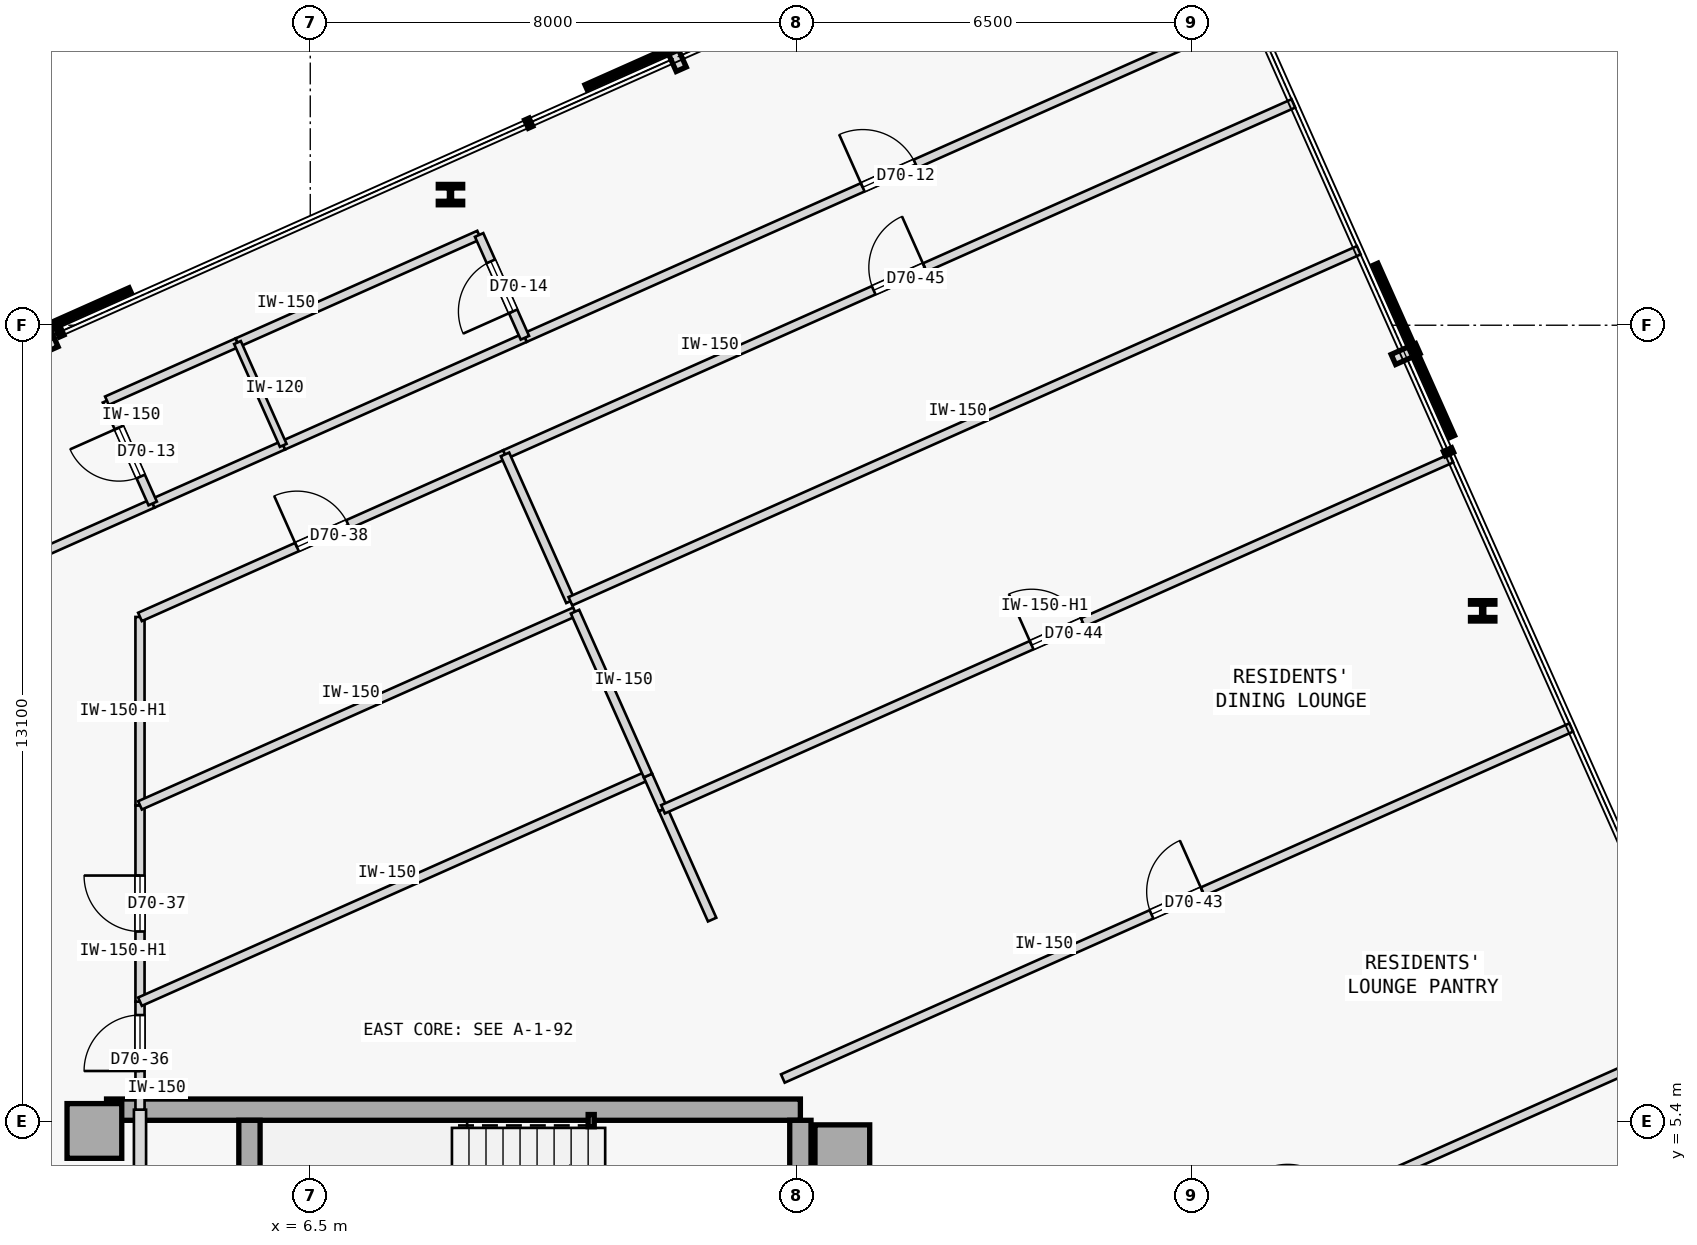
"""IFC4 building model, lengths in metres.
Left out: names, types, materials, properties, quantities, classifications, styles, units other than length and angle.
Written with IfcOpenShell. Run it as: python <this file> out.ifc"""

import sys

from ifc_helpers import new_model, si_unit, direction, frame, frame_2d, origin, origin_2d, place, context, subcontext, project, spatial, rectangle, hollow_rectangle, i_section, extrude, element, fill, save


model = new_model("IFC4")
c1 = context("Model", 3, precision=1e-05, world=origin(), true_north=direction((0.0, 1.0)))
c2 = subcontext(c1, "Body", "Model", "MODEL_VIEW")
j1 = project(units=[si_unit("LENGTHUNIT", "METRE"), si_unit("PLANEANGLEUNIT", "RADIAN")], contexts=[c1])
p1 = place(None, origin())
s1 = spatial("IfcSite", under=j1, at=p1, CompositionType="ELEMENT")
p2 = place(p1, origin())
s2 = spatial("IfcBuilding", under=s1, at=p2, CompositionType="ELEMENT")
p3 = place(p2, frame((0.0, 0.0, 262.2)))
s3 = spatial("IfcBuildingStorey", under=s2, at=p3, CompositionType="ELEMENT", Elevation=262.2)
for number, where, z_axis, x_axis in (
    (1, (15.25, 4.9, 0.0), (0.0, 0.0, 1.0), (1.0, 0.0, 0.0)),
    (2, (2.95, 5.25, 0.0), (0.0, 0.0, 1.0), (1.0, 0.0, 0.0)),
):
    element("IfcColumn", number, at=place(p3, frame(where, z_axis=z_axis, x_axis=x_axis)), inside=s3, PredefinedType="COLUMN", context=c2, shape_type="SweptSolid", body=[
        extrude(rectangle(XDim=0.9, YDim=0.9, at=origin_2d()), origin(), (0.0, 0.0, 1.0), 3.35),
    ])
p4 = place(p3, frame((3.15, 5.6, 0.0), z_axis=(0.0, 0.0, 1.0), x_axis=(1.0, 0.0, 0.0)))
e3 = element("IfcWall", 3, at=p4, inside=s3, PredefinedType="SHEAR", context=c2, shape_type="SweptSolid", body=[
    extrude(rectangle(XDim=11.41, YDim=0.35, at=frame_2d((5.705, 0.0))), origin(), (0.0, 0.0, 1.0), 3.125),
])
p5 = place(p3, frame((14.56, -5.425, 0.0), z_axis=(0.0, 0.0, 1.0), x_axis=(0.0, 1.0, 0.0)))
e4 = element("IfcWall", 4, at=p5, inside=s3, PredefinedType="SHEAR", context=c2, shape_type="SweptSolid", body=[
    extrude(rectangle(XDim=10.85, YDim=0.35, at=frame_2d((5.425, 0.0))), origin(), (0.0, 0.0, 1.0), 3.125),
])
p6 = place(p3, frame((5.5, 2.15, 0.0), z_axis=(0.0, 0.0, 1.0), x_axis=(0.0, 1.0, 0.0)))
e5 = element("IfcWall", 5, at=p6, inside=s3, PredefinedType="SHEAR", context=c2, shape_type="SweptSolid", body=[
    extrude(rectangle(XDim=3.275, YDim=0.35, at=frame_2d((1.638, 0.0))), origin(), (0.0, 0.0, 1.0), 3.125),
])
p7 = place(p3, frame((11.12, 5.42, 0.0), z_axis=(0.0, 0.0, 1.0), x_axis=(1.0, 0.0, 0.0)))
e6 = element("IfcColumn", 6, at=p7, inside=s3, PredefinedType="COLUMN", context=c2, shape_type="SweptSolid", body=[
    extrude(hollow_rectangle(XDim=0.1, YDim=0.2, WallThickness=0.008, at=origin_2d()), origin(), (0.0, 0.0, 1.0), 3.35),
])
for number, where, z_axis, x_axis in (
    (7, (25.781, 13.803, 0.0), (0.0, 0.0, 1.0), (1.0, 0.0, 0.0)),
    (8, (8.806, 20.648, 0.0), (0.0, 0.0, 1.0), (1.0, 0.0, 0.0)),
):
    element("IfcColumn", number, at=place(p3, frame(where, z_axis=z_axis, x_axis=x_axis)), inside=s3, PredefinedType="COLUMN", context=c2, shape_type="SweptSolid", body=[
        extrude(i_section(OverallWidth=0.401, OverallDepth=0.335, WebThickness=0.036, FlangeThickness=0.058, FilletRadius=0.015, at=origin_2d()), origin(), (0.0, 0.0, 1.0), 3.35),
    ])
p8 = place(p3, frame((3.7, -1.15, 0.0), z_axis=(0.0, 0.0, 1.0), x_axis=(0.0, 1.0, 0.0)))
e9 = element("IfcWall", 9, at=p8, inside=s3, PredefinedType="STANDARD", context=c2, shape_type="SweptSolid", body=[
    extrude(rectangle(XDim=6.75, YDim=0.2, at=frame_2d((3.375, 0.0))), origin(), (0.0, 0.0, 1.0), 3.125),
])
p9 = place(p8, frame((3.6, 0.0, 0.0)))
e10 = element("IfcOpeningElement", 10, at=p9, cuts=e9, PredefinedType="OPENING", context=c2, shape_type="SweptSolid", body=[
    extrude(rectangle(XDim=0.92, YDim=2.15, at=frame_2d((0.46, 1.075))), frame((0.0, 0.11, 0.0), z_axis=(0.0, -1.0, 0.0), x_axis=(1.0, 0.0, 0.0)), (0.0, 0.0, 1.0), 0.22),
])
p10 = place(p3, frame((-1.166, 13.31, 0.0), z_axis=(0.0, 0.0, 1.0), x_axis=(0.913554005831, 0.406717442988, 0.0)))
e11 = element("IfcWall", 11, at=p10, inside=s3, PredefinedType="PARTITIONING", context=c2, shape_type="SweptSolid", body=[
    extrude(rectangle(XDim=5.555, YDim=0.15, at=frame_2d((2.777, 0.0))), origin(), (0.0, 0.0, 1.0), 3.125),
])
p11 = place(p3, frame((10.03, 18.294, 0.0), z_axis=(0.0, 0.0, 1.0), x_axis=(0.913545706015, 0.406736085222, 0.0)))
e12 = element("IfcWall", 12, at=p11, inside=s3, PredefinedType="PARTITIONING", context=c2, shape_type="SweptSolid", body=[
    extrude(rectangle(XDim=13.113, YDim=0.15, at=frame_2d((6.557, 0.0))), origin(), (0.0, 0.0, 1.0), 3.125),
])
p12 = place(p11, frame((6.082, 0.0, 0.0)))
e13 = element("IfcOpeningElement", 13, at=p12, cuts=e12, PredefinedType="OPENING", context=c2, shape_type="SweptSolid", body=[
    extrude(rectangle(XDim=0.95, YDim=2.15, at=frame_2d((0.475, 1.075))), frame((0.0, 0.085, 0.0), z_axis=(0.0, -1.0, 0.0), x_axis=(1.0, 0.0, 0.0)), (0.0, 0.0, 1.0), 0.17),
])
p13 = place(p3, frame((3.909, 15.569, 0.0), z_axis=(0.0, 0.0, 1.0), x_axis=(0.913541436194, 0.406745675276, 0.0)))
e14 = element("IfcWall", 14, at=p13, inside=s3, PredefinedType="PARTITIONING", context=c2, shape_type="SweptSolid", body=[
    extrude(rectangle(XDim=2.35, YDim=0.15, at=frame_2d((1.175, 0.0))), origin(), (0.0, 0.0, 1.0), 3.125),
])
p14 = place(p3, frame((6.055, 16.525, 0.0), z_axis=(0.0, 0.0, 1.0), x_axis=(0.913554477336, 0.406716383908, 0.0)))
e15 = element("IfcWall", 15, at=p14, inside=s3, PredefinedType="PARTITIONING", context=c2, shape_type="SweptSolid", body=[
    extrude(rectangle(XDim=4.35, YDim=0.15, at=frame_2d((2.175, 0.0))), origin(), (0.0, 0.0, 1.0), 3.125),
])
p15 = place(p3, frame((3.7, 5.601, 0.0), z_axis=(0.0, 0.0, 1.0), x_axis=(0.0, 1.0, 0.0)))
e16 = element("IfcWall", 16, at=p15, inside=s3, PredefinedType="PARTITIONING", context=c2, shape_type="SweptSolid", body=[
    extrude(rectangle(XDim=1.775, YDim=0.15, at=frame_2d((0.888, 0.0))), origin(), (0.0, 0.0, 1.0), 3.125),
])
p16 = place(p15, frame((0.635, 0.0, 0.0)))
e17 = element("IfcOpeningElement", 17, at=p16, cuts=e16, PredefinedType="OPENING", context=c2, shape_type="SweptSolid", body=[
    extrude(rectangle(XDim=0.92, YDim=2.15, at=frame_2d((0.46, 1.075))), frame((0.0, 0.085, 0.0), z_axis=(0.0, -1.0, 0.0), x_axis=(1.0, 0.0, 0.0)), (0.0, 0.0, 1.0), 0.17),
])
p17 = place(p3, frame((3.7, 7.376, 0.0), z_axis=(0.0, 0.0, 1.0), x_axis=(0.0, 1.0, 0.0)))
e18 = element("IfcWall", 18, at=p17, inside=s3, PredefinedType="PARTITIONING", context=c2, shape_type="SweptSolid", body=[
    extrude(rectangle(XDim=3.228, YDim=0.15, at=frame_2d((1.614, 0.0))), origin(), (0.0, 0.0, 1.0), 2.675),
])
p18 = place(p17, frame((1.154, 0.0, 0.0)))
e19 = element("IfcOpeningElement", 19, at=p18, cuts=e18, PredefinedType="OPENING", context=c2, shape_type="SweptSolid", body=[
    extrude(rectangle(XDim=0.92, YDim=2.15, at=frame_2d((0.46, 1.075))), frame((0.0, 0.085, 0.0), z_axis=(0.0, -1.0, 0.0), x_axis=(1.0, 0.0, 0.0)), (0.0, 0.0, 1.0), 0.17),
])
p19 = place(p3, frame((3.7, 10.604, 0.0), z_axis=(0.0, 0.0, 1.0), x_axis=(-0.000157567161, 0.999999987586, 0.0)))
e20 = element("IfcWall", 20, at=p19, inside=s3, PredefinedType="PARTITIONING", context=c2, shape_type="SweptSolid", body=[
    extrude(rectangle(XDim=3.099, YDim=0.15, at=frame_2d((1.549, 0.0))), origin(), (0.0, 0.0, 1.0), 2.675),
])
p20 = place(p3, frame((3.7, 13.703, 0.0), z_axis=(0.0, 0.0, 1.0), x_axis=(0.913549363376, 0.406727870542, 0.0)))
e21 = element("IfcWall", 21, at=p20, inside=s3, PredefinedType="PARTITIONING", context=c2, shape_type="SweptSolid", body=[
    extrude(rectangle(XDim=6.571, YDim=0.15, at=frame_2d((3.286, 0.0))), origin(), (0.0, 0.0, 1.0), 3.125),
])
p21 = place(p20, frame((2.825, 0.0, 0.0)))
e22 = element("IfcOpeningElement", 22, at=p21, cuts=e21, PredefinedType="OPENING", context=c2, shape_type="SweptSolid", body=[
    extrude(rectangle(XDim=0.92, YDim=2.15, at=frame_2d((0.46, 1.075))), frame((0.0, 0.085, 0.0), z_axis=(0.0, -1.0, 0.0), x_axis=(1.0, 0.0, 0.0)), (0.0, 0.0, 1.0), 0.17),
])
p22 = place(p3, frame((9.703, 16.375, 0.0), z_axis=(0.0, 0.0, 1.0), x_axis=(0.913544622417, 0.406738519018, 0.0)))
e23 = element("IfcWall", 23, at=p22, inside=s3, PredefinedType="PARTITIONING", context=c2, shape_type="SweptSolid", body=[
    extrude(rectangle(XDim=14.192, YDim=0.15, at=frame_2d((7.096, 0.0))), origin(), (0.0, 0.0, 1.0), 3.125),
])
p23 = place(p22, frame((6.636, 0.0, 0.0)))
e24 = element("IfcOpeningElement", 24, at=p23, cuts=e23, PredefinedType="OPENING", context=c2, shape_type="SweptSolid", body=[
    extrude(rectangle(XDim=0.92, YDim=2.15, at=frame_2d((0.46, 1.075))), frame((0.0, 0.085, 0.0), z_axis=(0.0, -1.0, 0.0), x_axis=(1.0, 0.0, 0.0)), (0.0, 0.0, 1.0), 0.17),
])
p24 = place(p3, frame((3.909, 15.569, 0.0), z_axis=(0.0, 0.0, 1.0), x_axis=(-0.406701600856, 0.913561058639, 0.0)))
e25 = element("IfcWall", 25, at=p24, inside=s3, PredefinedType="PARTITIONING", context=c2, shape_type="SweptSolid", body=[
    extrude(rectangle(XDim=1.85, YDim=0.15, at=frame_2d((0.925, 0.0))), origin(), (0.0, 0.0, 1.0), 3.125),
])
p25 = place(p24, frame((0.485, 0.0, 0.0)))
e26 = element("IfcOpeningElement", 26, at=p25, cuts=e25, PredefinedType="OPENING", context=c2, shape_type="SweptSolid", body=[
    extrude(rectangle(XDim=0.88, YDim=2.15, at=frame_2d((0.44, 1.075))), frame((0.0, 0.085, 0.0), z_axis=(0.0, -1.0, 0.0), x_axis=(1.0, 0.0, 0.0)), (0.0, 0.0, 1.0), 0.17),
])
p26 = place(p3, frame((3.156, 17.259, 0.0), z_axis=(0.0, 0.0, 1.0), x_axis=(0.913541436194, 0.406745675276, 0.0)))
e27 = element("IfcWall", 27, at=p26, inside=s3, PredefinedType="PARTITIONING", context=c2, shape_type="SweptSolid", body=[
    extrude(rectangle(XDim=2.35, YDim=0.15, at=frame_2d((1.175, 0.0))), origin(), (0.0, 0.0, 1.0), 3.125),
])
p27 = place(p3, frame((5.303, 18.215, 0.0), z_axis=(0.0, 0.0, 1.0), x_axis=(0.913554477336, 0.406716383908, 0.0)))
e28 = element("IfcWall", 28, at=p27, inside=s3, PredefinedType="PARTITIONING", context=c2, shape_type="SweptSolid", body=[
    extrude(rectangle(XDim=4.35, YDim=0.15, at=frame_2d((2.175, 0.0))), origin(), (0.0, 0.0, 1.0), 3.125),
])
p28 = place(p3, frame((10.03, 18.294, 0.0), z_axis=(0.0, 0.0, 1.0), x_axis=(-0.406701600856, 0.913561058639, 0.0)))
e29 = element("IfcWall", 29, at=p28, inside=s3, PredefinedType="PARTITIONING", context=c2, shape_type="SweptSolid", body=[
    extrude(rectangle(XDim=1.85, YDim=0.15, at=frame_2d((0.925, 0.0))), origin(), (0.0, 0.0, 1.0), 3.125),
])
p29 = place(p28, frame((0.475, 0.0, 0.0)))
e30 = element("IfcOpeningElement", 30, at=p29, cuts=e29, PredefinedType="OPENING", context=c2, shape_type="SweptSolid", body=[
    extrude(rectangle(XDim=0.9, YDim=2.15, at=frame_2d((0.45, 1.075))), frame((0.0, 0.085, 0.0), z_axis=(0.0, -1.0, 0.0), x_axis=(1.0, 0.0, 0.0)), (0.0, 0.0, 1.0), 0.17),
])
p30 = place(p3, frame((6.055, 16.525, 0.0), z_axis=(0.0, 0.0, 1.0), x_axis=(-0.406701600856, 0.913561058639, 0.0)))
e31 = element("IfcWall", 31, at=p30, inside=s3, PredefinedType="PARTITIONING", context=c2, shape_type="SweptSolid", body=[
    extrude(rectangle(XDim=1.85, YDim=0.12, at=frame_2d((0.925, 0.0))), origin(), (0.0, 0.0, 1.0), 3.125),
])
p31 = place(p3, frame((3.7, 7.376, 0.0), z_axis=(0.0, 0.0, 1.0), x_axis=(0.91354490899, 0.406737875367, 0.0)))
e32 = element("IfcWall", 32, at=p31, inside=s3, PredefinedType="PARTITIONING", context=c2, shape_type="SweptSolid", body=[
    extrude(rectangle(XDim=9.144, YDim=0.15, at=frame_2d((4.572, 0.0))), origin(), (0.0, 0.0, 1.0), 3.125),
])
p32 = place(p3, frame((13.109, 8.726, 0.0), z_axis=(0.0, 0.0, 1.0), x_axis=(-0.406788519224, 0.913522359128, 0.0)))
e33 = element("IfcWall", 33, at=p32, inside=s3, PredefinedType="PARTITIONING", context=c2, shape_type="SweptSolid", body=[
    extrude(rectangle(XDim=1.986, YDim=0.15, at=frame_2d((0.993, 0.0))), origin(), (0.0, 0.0, 1.0), 3.125),
])
p33 = place(p3, frame((12.301, 10.54, 0.0), z_axis=(0.0, 0.0, 1.0), x_axis=(-0.406436552015, 0.913679007741, 0.0)))
e34 = element("IfcWall", 34, at=p33, inside=s3, PredefinedType="PARTITIONING", context=c2, shape_type="SweptSolid", body=[
    extrude(rectangle(XDim=0.608, YDim=0.15, at=frame_2d((0.304, 0.0))), origin(), (0.0, 0.0, 1.0), 3.125),
])
p34 = place(p3, frame((3.7, 10.604, 0.0), z_axis=(0.0, 0.0, 1.0), x_axis=(0.913534926439, 0.406760295722, 0.0)))
e35 = element("IfcWall", 35, at=p34, inside=s3, PredefinedType="PARTITIONING", context=c2, shape_type="SweptSolid", body=[
    extrude(rectangle(XDim=7.831, YDim=0.15, at=frame_2d((3.916, 0.0))), origin(), (0.0, 0.0, 1.0), 3.125),
])
p35 = place(p3, frame((12.054, 11.095, 0.0), z_axis=(0.0, 0.0, 1.0), x_axis=(-0.406798922371, 0.91351772657, 0.0)))
e36 = element("IfcWall", 36, at=p35, inside=s3, PredefinedType="PARTITIONING", context=c2, shape_type="SweptSolid", body=[
    extrude(rectangle(XDim=2.949, YDim=0.15, at=frame_2d((1.475, 0.0))), origin(), (0.0, 0.0, 1.0), 3.125),
])
p36 = place(p3, frame((10.778, 13.961, 0.0), z_axis=(0.0, 0.0, 1.0), x_axis=(-0.406712614091, 0.913556155657, 0.0)))
e37 = element("IfcWall", 37, at=p36, inside=s3, PredefinedType="PARTITIONING", context=c2, shape_type="SweptSolid", body=[
    extrude(rectangle(XDim=2.643, YDim=0.15, at=frame_2d((1.322, 0.0))), origin(), (0.0, 0.0, 1.0), 3.125),
])
p37 = place(p3, frame((16.512, 1.082, 0.0), z_axis=(0.0, 0.0, 1.0), x_axis=(0.913544622417, 0.406738519018, 0.0)))
e38 = element("IfcWall", 38, at=p37, inside=s3, PredefinedType="PARTITIONING", context=c2, shape_type="SweptSolid", body=[
    extrude(rectangle(XDim=14.192, YDim=0.15, at=frame_2d((7.096, 0.0))), origin(), (0.0, 0.0, 1.0), 3.125),
])
p38 = place(p37, frame((6.636, 0.0, 0.0)))
e39 = element("IfcOpeningElement", 39, at=p38, cuts=e38, PredefinedType="OPENING", context=c2, shape_type="SweptSolid", body=[
    extrude(rectangle(XDim=0.92, YDim=2.15, at=frame_2d((0.46, 1.075))), frame((0.0, 0.085, 0.0), z_axis=(0.0, -1.0, 0.0), x_axis=(1.0, 0.0, 0.0)), (0.0, 0.0, 1.0), 0.17),
])
p39 = place(p3, frame((14.272, 6.113, 0.0), z_axis=(0.0, 0.0, 1.0), x_axis=(0.913551014388, 0.406724162191, 0.0)))
e40 = element("IfcWall", 40, at=p39, inside=s3, PredefinedType="PARTITIONING", context=c2, shape_type="SweptSolid", body=[
    extrude(rectangle(XDim=14.192, YDim=0.15, at=frame_2d((7.096, 0.0))), origin(), (0.0, 0.0, 1.0), 3.125),
])
p40 = place(p39, frame((6.636, 0.0, 0.0)))
e41 = element("IfcOpeningElement", 41, at=p40, cuts=e40, PredefinedType="OPENING", context=c2, shape_type="SweptSolid", body=[
    extrude(rectangle(XDim=0.92, YDim=2.15, at=frame_2d((0.46, 1.075))), frame((0.0, 0.085, 0.0), z_axis=(0.0, -1.0, 0.0), x_axis=(1.0, 0.0, 0.0)), (0.0, 0.0, 1.0), 0.17),
])
p41 = place(p3, frame((12.301, 10.54, 0.0), z_axis=(0.0, 0.0, 1.0), x_axis=(0.913544622417, 0.406738519018, 0.0)))
e42 = element("IfcWall", 42, at=p41, inside=s3, PredefinedType="PARTITIONING", context=c2, shape_type="SweptSolid", body=[
    extrude(rectangle(XDim=14.192, YDim=0.15, at=frame_2d((7.096, 0.0))), origin(), (0.0, 0.0, 1.0), 2.675),
])
p42 = place(p41, frame((6.636, 0.0, 0.0)))
e43 = element("IfcOpeningElement", 43, at=p42, cuts=e42, PredefinedType="OPENING", context=c2, shape_type="SweptSolid", body=[
    extrude(rectangle(XDim=0.92, YDim=2.15, at=frame_2d((0.46, 1.075))), frame((0.0, 0.085, 0.0), z_axis=(0.0, -1.0, 0.0), x_axis=(1.0, 0.0, 0.0)), (0.0, 0.0, 1.0), 0.17),
])
p43 = place(p3, frame((10.778, 13.961, 0.0), z_axis=(0.0, 0.0, 1.0), x_axis=(0.913544622417, 0.406738519018, 0.0)))
e44 = element("IfcWall", 44, at=p43, inside=s3, PredefinedType="PARTITIONING", context=c2, shape_type="SweptSolid", body=[
    extrude(rectangle(XDim=14.192, YDim=0.15, at=frame_2d((7.096, 0.0))), origin(), (0.0, 0.0, 1.0), 3.125),
])
p44 = place(p12, origin())
e45 = element("IfcDoor", 45, at=p44, inside=s3, OperationType="SINGLE_SWING_LEFT", PredefinedType="DOOR", context=c2, shape_type="SweptSolid", body=[
    extrude(rectangle(XDim=0.95, YDim=2.15, at=frame_2d((0.475, 1.075))), frame((0.0, 0.025, 0.0), z_axis=(0.0, -1.0, 0.0), x_axis=(1.0, 0.0, 0.0)), (0.0, 0.0, 1.0), 0.05),
])
fill(e13, e45)
p45 = place(p25, origin())
e46 = element("IfcDoor", 46, at=p45, inside=s3, OperationType="SINGLE_SWING_RIGHT", PredefinedType="DOOR", context=c2, shape_type="SweptSolid", body=[
    extrude(rectangle(XDim=0.88, YDim=2.15, at=frame_2d((0.44, 1.075))), frame((0.0, 0.025, 0.0), z_axis=(0.0, -1.0, 0.0), x_axis=(1.0, 0.0, 0.0)), (0.0, 0.0, 1.0), 0.05),
])
fill(e26, e46)
p46 = place(p29, origin())
e47 = element("IfcDoor", 47, at=p46, inside=s3, OperationType="SINGLE_SWING_LEFT", PredefinedType="DOOR", context=c2, shape_type="SweptSolid", body=[
    extrude(rectangle(XDim=0.9, YDim=2.15, at=frame_2d((0.45, 1.075))), frame((0.0, 0.025, 0.0), z_axis=(0.0, -1.0, 0.0), x_axis=(1.0, 0.0, 0.0)), (0.0, 0.0, 1.0), 0.05),
])
fill(e30, e47)
p47 = place(p16, origin())
e48 = element("IfcDoor", 48, at=p47, inside=s3, OperationType="SINGLE_SWING_LEFT", PredefinedType="DOOR", context=c2, shape_type="SweptSolid", body=[
    extrude(rectangle(XDim=0.92, YDim=2.15, at=frame_2d((0.46, 1.075))), frame((0.0, 0.025, 0.0), z_axis=(0.0, -1.0, 0.0), x_axis=(1.0, 0.0, 0.0)), (0.0, 0.0, 1.0), 0.05),
])
fill(e17, e48)
p48 = place(p18, origin())
e49 = element("IfcDoor", 49, at=p48, inside=s3, OperationType="SINGLE_SWING_RIGHT", PredefinedType="DOOR", context=c2, shape_type="SweptSolid", body=[
    extrude(rectangle(XDim=0.92, YDim=2.15, at=frame_2d((0.46, 1.075))), frame((0.0, 0.025, 0.0), z_axis=(0.0, -1.0, 0.0), x_axis=(1.0, 0.0, 0.0)), (0.0, 0.0, 1.0), 0.05),
])
fill(e19, e49)
p49 = place(p21, origin())
e50 = element("IfcDoor", 50, at=p49, inside=s3, OperationType="SINGLE_SWING_LEFT", PredefinedType="DOOR", context=c2, shape_type="SweptSolid", body=[
    extrude(rectangle(XDim=0.92, YDim=2.15, at=frame_2d((0.46, 1.075))), frame((0.0, 0.025, 0.0), z_axis=(0.0, -1.0, 0.0), x_axis=(1.0, 0.0, 0.0)), (0.0, 0.0, 1.0), 0.05),
])
fill(e22, e50)
p50 = place(p40, origin())
e51 = element("IfcDoor", 51, at=p50, inside=s3, OperationType="SINGLE_SWING_RIGHT", PredefinedType="DOOR", context=c2, shape_type="SweptSolid", body=[
    extrude(rectangle(XDim=0.92, YDim=2.15, at=frame_2d((0.46, 1.075))), frame((0.0, 0.025, 0.0), z_axis=(0.0, -1.0, 0.0), x_axis=(1.0, 0.0, 0.0)), (0.0, 0.0, 1.0), 0.05),
])
fill(e41, e51)
p51 = place(p42, origin())
e52 = element("IfcDoor", 52, at=p51, inside=s3, OperationType="SINGLE_SWING_LEFT", PredefinedType="DOOR", context=c2, shape_type="SweptSolid", body=[
    extrude(rectangle(XDim=0.92, YDim=2.15, at=frame_2d((0.46, 1.075))), frame((0.0, 0.025, 0.0), z_axis=(0.0, -1.0, 0.0), x_axis=(1.0, 0.0, 0.0)), (0.0, 0.0, 1.0), 0.05),
])
fill(e43, e52)
p52 = place(p23, origin())
e53 = element("IfcDoor", 53, at=p52, inside=s3, OperationType="SINGLE_SWING_RIGHT", PredefinedType="DOOR", context=c2, shape_type="SweptSolid", body=[
    extrude(rectangle(XDim=0.92, YDim=2.15, at=frame_2d((0.46, 1.075))), frame((0.0, 0.025, 0.0), z_axis=(0.0, -1.0, 0.0), x_axis=(1.0, 0.0, 0.0)), (0.0, 0.0, 1.0), 0.05),
])
fill(e24, e53)
save(model, sys.argv[1])
